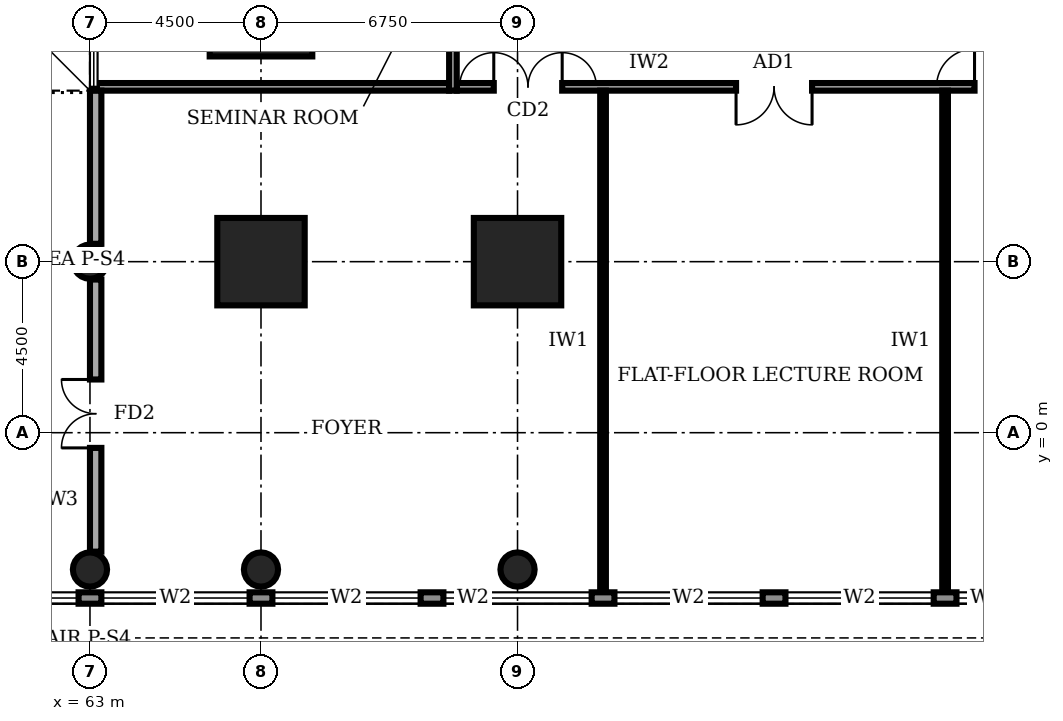
"""IFC4 building model, lengths in metres.
Left out: names, types, materials, properties, quantities, classifications, styles, units other than length and angle.
Written with IfcOpenShell. Run it as: python <this file> out.ifc"""

import sys

from ifc_helpers import new_model, si_unit, direction, frame, frame_2d, origin, origin_2d, place, context, subcontext, project, spatial, rectangle, circle, extrude, element, fill, save


model = new_model("IFC4")
c1 = context("Model", 3, precision=1e-05, world=origin(), true_north=direction((0.0, 1.0)))
c2 = subcontext(c1, "Body", "Model", "MODEL_VIEW")
j1 = project(units=[si_unit("LENGTHUNIT", "METRE"), si_unit("PLANEANGLEUNIT", "RADIAN")], contexts=[c1])
p1 = place(None, origin())
s1 = spatial("IfcSite", under=j1, at=p1, CompositionType="ELEMENT")
p2 = place(p1, origin())
s2 = spatial("IfcBuilding", under=s1, at=p2, CompositionType="ELEMENT")
p3 = place(p2, frame((0.0, 0.0, 6.0)))
s3 = spatial("IfcBuildingStorey", under=s2, at=p3, CompositionType="ELEMENT", Elevation=6.0)
for number, where, z_axis, x_axis in (
    (1, (67.5, 4.5, 0.0), (0.0, 0.0, 1.0), (1.0, 0.0, 0.0)),
    (2, (74.25, 4.5, 0.0), (0.0, 0.0, 1.0), (1.0, 0.0, 0.0)),
):
    element("IfcColumn", number, at=place(p3, frame(where, z_axis=z_axis, x_axis=x_axis)), inside=s3, PredefinedType="COLUMN", context=c2, shape_type="SweptSolid", body=[
        extrude(rectangle(XDim=2.3, YDim=2.3, at=origin_2d()), origin(), (0.0, 0.0, 1.0), 5.0),
    ])
p4 = place(p3, frame((67.5, 11.25, 0.0), z_axis=(0.0, 0.0, 1.0), x_axis=(1.0, 0.0, 0.0)))
e3 = element("IfcColumn", 3, at=p4, inside=s3, PredefinedType="COLUMN", context=c2, shape_type="SweptSolid", body=[
    extrude(rectangle(XDim=2.7, YDim=2.7, at=origin_2d()), origin(), (0.0, 0.0, 1.0), 5.0),
])
for number, where, z_axis, x_axis in (
    (4, (63.0, -3.6, 0.0), (0.0, 0.0, 1.0), (1.0, 0.0, 0.0)),
    (5, (67.5, -3.6, 0.0), (0.0, 0.0, 1.0), (1.0, 0.0, 0.0)),
    (6, (74.25, -3.6, 0.0), (0.0, 0.0, 1.0), (1.0, 0.0, 0.0)),
    (7, (63.0, 4.5, 0.0), (0.0, 0.0, 1.0), (1.0, 0.0, 0.0)),
):
    element("IfcColumn", number, at=place(p3, frame(where, z_axis=z_axis, x_axis=x_axis)), inside=s3, PredefinedType="COLUMN", context=c2, shape_type="SweptSolid", body=[
        extrude(circle(Radius=0.45, at=origin_2d()), origin(), (0.0, 0.0, 1.0), 5.0),
    ])
p5 = place(p3, frame((0.02, -4.35, 0.0), z_axis=(0.0, 0.0, 1.0), x_axis=(1.0, 0.0, 0.0)))
e8 = element("IfcWall", 8, at=p5, inside=s3, PredefinedType="STANDARD", context=c2, shape_type="SweptSolid", body=[
    extrude(rectangle(XDim=98.96, YDim=0.3, at=frame_2d((49.48, 0.0))), origin(), (0.0, 0.0, 1.0), 4.7),
])
p6 = place(p5, frame((4.78, 0.0, 0.6)))
e9 = element("IfcOpeningElement", 9, at=p6, cuts=e8, PredefinedType="OPENING", context=c2, shape_type="SweptSolid", body=[
    extrude(rectangle(XDim=3.9, YDim=2.6, at=frame_2d((1.95, 1.3))), frame((0.0, 0.16, 0.0), z_axis=(0.0, -1.0, 0.0), x_axis=(1.0, 0.0, 0.0)), (0.0, 0.0, 1.0), 0.32),
])
p7 = place(p5, frame((9.28, 0.0, 0.6)))
e10 = element("IfcOpeningElement", 10, at=p7, cuts=e8, PredefinedType="OPENING", context=c2, shape_type="SweptSolid", body=[
    extrude(rectangle(XDim=3.9, YDim=2.6, at=frame_2d((1.95, 1.3))), frame((0.0, 0.16, 0.0), z_axis=(0.0, -1.0, 0.0), x_axis=(1.0, 0.0, 0.0)), (0.0, 0.0, 1.0), 0.32),
])
p8 = place(p5, frame((13.78, 0.0, 0.6)))
e11 = element("IfcOpeningElement", 11, at=p8, cuts=e8, PredefinedType="OPENING", context=c2, shape_type="SweptSolid", body=[
    extrude(rectangle(XDim=3.9, YDim=2.6, at=frame_2d((1.95, 1.3))), frame((0.0, 0.16, 0.0), z_axis=(0.0, -1.0, 0.0), x_axis=(1.0, 0.0, 0.0)), (0.0, 0.0, 1.0), 0.32),
])
p9 = place(p5, frame((18.28, 0.0, 0.6)))
e12 = element("IfcOpeningElement", 12, at=p9, cuts=e8, PredefinedType="OPENING", context=c2, shape_type="SweptSolid", body=[
    extrude(rectangle(XDim=3.9, YDim=2.6, at=frame_2d((1.95, 1.3))), frame((0.0, 0.16, 0.0), z_axis=(0.0, -1.0, 0.0), x_axis=(1.0, 0.0, 0.0)), (0.0, 0.0, 1.0), 0.32),
])
p10 = place(p5, frame((22.78, 0.0, 0.6)))
e13 = element("IfcOpeningElement", 13, at=p10, cuts=e8, PredefinedType="OPENING", context=c2, shape_type="SweptSolid", body=[
    extrude(rectangle(XDim=3.9, YDim=2.6, at=frame_2d((1.95, 1.3))), frame((0.0, 0.16, 0.0), z_axis=(0.0, -1.0, 0.0), x_axis=(1.0, 0.0, 0.0)), (0.0, 0.0, 1.0), 0.32),
])
p11 = place(p5, frame((27.28, 0.0, 0.6)))
e14 = element("IfcOpeningElement", 14, at=p11, cuts=e8, PredefinedType="OPENING", context=c2, shape_type="SweptSolid", body=[
    extrude(rectangle(XDim=3.9, YDim=2.6, at=frame_2d((1.95, 1.3))), frame((0.0, 0.16, 0.0), z_axis=(0.0, -1.0, 0.0), x_axis=(1.0, 0.0, 0.0)), (0.0, 0.0, 1.0), 0.32),
])
p12 = place(p5, frame((31.78, 0.0, 0.6)))
e15 = element("IfcOpeningElement", 15, at=p12, cuts=e8, PredefinedType="OPENING", context=c2, shape_type="SweptSolid", body=[
    extrude(rectangle(XDim=3.9, YDim=2.6, at=frame_2d((1.95, 1.3))), frame((0.0, 0.16, 0.0), z_axis=(0.0, -1.0, 0.0), x_axis=(1.0, 0.0, 0.0)), (0.0, 0.0, 1.0), 0.32),
])
p13 = place(p5, frame((36.28, 0.0, 0.6)))
e16 = element("IfcOpeningElement", 16, at=p13, cuts=e8, PredefinedType="OPENING", context=c2, shape_type="SweptSolid", body=[
    extrude(rectangle(XDim=3.9, YDim=2.6, at=frame_2d((1.95, 1.3))), frame((0.0, 0.16, 0.0), z_axis=(0.0, -1.0, 0.0), x_axis=(1.0, 0.0, 0.0)), (0.0, 0.0, 1.0), 0.32),
])
p14 = place(p5, frame((40.78, 0.0, 0.6)))
e17 = element("IfcOpeningElement", 17, at=p14, cuts=e8, PredefinedType="OPENING", context=c2, shape_type="SweptSolid", body=[
    extrude(rectangle(XDim=3.9, YDim=2.6, at=frame_2d((1.95, 1.3))), frame((0.0, 0.16, 0.0), z_axis=(0.0, -1.0, 0.0), x_axis=(1.0, 0.0, 0.0)), (0.0, 0.0, 1.0), 0.32),
])
p15 = place(p5, frame((45.28, 0.0, 0.6)))
e18 = element("IfcOpeningElement", 18, at=p15, cuts=e8, PredefinedType="OPENING", context=c2, shape_type="SweptSolid", body=[
    extrude(rectangle(XDim=3.9, YDim=2.6, at=frame_2d((1.95, 1.3))), frame((0.0, 0.16, 0.0), z_axis=(0.0, -1.0, 0.0), x_axis=(1.0, 0.0, 0.0)), (0.0, 0.0, 1.0), 0.32),
])
p16 = place(p5, frame((49.78, 0.0, 0.6)))
e19 = element("IfcOpeningElement", 19, at=p16, cuts=e8, PredefinedType="OPENING", context=c2, shape_type="SweptSolid", body=[
    extrude(rectangle(XDim=3.9, YDim=2.6, at=frame_2d((1.95, 1.3))), frame((0.0, 0.16, 0.0), z_axis=(0.0, -1.0, 0.0), x_axis=(1.0, 0.0, 0.0)), (0.0, 0.0, 1.0), 0.32),
])
p17 = place(p5, frame((54.28, 0.0, 0.6)))
e20 = element("IfcOpeningElement", 20, at=p17, cuts=e8, PredefinedType="OPENING", context=c2, shape_type="SweptSolid", body=[
    extrude(rectangle(XDim=3.9, YDim=2.6, at=frame_2d((1.95, 1.3))), frame((0.0, 0.16, 0.0), z_axis=(0.0, -1.0, 0.0), x_axis=(1.0, 0.0, 0.0)), (0.0, 0.0, 1.0), 0.32),
])
p18 = place(p5, frame((58.78, 0.0, 0.6)))
e21 = element("IfcOpeningElement", 21, at=p18, cuts=e8, PredefinedType="OPENING", context=c2, shape_type="SweptSolid", body=[
    extrude(rectangle(XDim=3.9, YDim=2.6, at=frame_2d((1.95, 1.3))), frame((0.0, 0.16, 0.0), z_axis=(0.0, -1.0, 0.0), x_axis=(1.0, 0.0, 0.0)), (0.0, 0.0, 1.0), 0.32),
])
p19 = place(p5, frame((63.28, 0.0, 0.6)))
e22 = element("IfcOpeningElement", 22, at=p19, cuts=e8, PredefinedType="OPENING", context=c2, shape_type="SweptSolid", body=[
    extrude(rectangle(XDim=3.9, YDim=2.6, at=frame_2d((1.95, 1.3))), frame((0.0, 0.16, 0.0), z_axis=(0.0, -1.0, 0.0), x_axis=(1.0, 0.0, 0.0)), (0.0, 0.0, 1.0), 0.32),
])
p20 = place(p5, frame((67.78, 0.0, 0.6)))
e23 = element("IfcOpeningElement", 23, at=p20, cuts=e8, PredefinedType="OPENING", context=c2, shape_type="SweptSolid", body=[
    extrude(rectangle(XDim=3.9, YDim=2.6, at=frame_2d((1.95, 1.3))), frame((0.0, 0.16, 0.0), z_axis=(0.0, -1.0, 0.0), x_axis=(1.0, 0.0, 0.0)), (0.0, 0.0, 1.0), 0.32),
])
p21 = place(p5, frame((72.28, 0.0, 0.6)))
e24 = element("IfcOpeningElement", 24, at=p21, cuts=e8, PredefinedType="OPENING", context=c2, shape_type="SweptSolid", body=[
    extrude(rectangle(XDim=3.9, YDim=2.6, at=frame_2d((1.95, 1.3))), frame((0.0, 0.16, 0.0), z_axis=(0.0, -1.0, 0.0), x_axis=(1.0, 0.0, 0.0)), (0.0, 0.0, 1.0), 0.32),
])
p22 = place(p5, frame((76.78, 0.0, 0.6)))
e25 = element("IfcOpeningElement", 25, at=p22, cuts=e8, PredefinedType="OPENING", context=c2, shape_type="SweptSolid", body=[
    extrude(rectangle(XDim=3.9, YDim=2.6, at=frame_2d((1.95, 1.3))), frame((0.0, 0.16, 0.0), z_axis=(0.0, -1.0, 0.0), x_axis=(1.0, 0.0, 0.0)), (0.0, 0.0, 1.0), 0.32),
])
p23 = place(p5, frame((81.28, 0.0, 0.6)))
e26 = element("IfcOpeningElement", 26, at=p23, cuts=e8, PredefinedType="OPENING", context=c2, shape_type="SweptSolid", body=[
    extrude(rectangle(XDim=3.9, YDim=2.6, at=frame_2d((1.95, 1.3))), frame((0.0, 0.16, 0.0), z_axis=(0.0, -1.0, 0.0), x_axis=(1.0, 0.0, 0.0)), (0.0, 0.0, 1.0), 0.32),
])
p24 = place(p5, frame((85.78, 0.0, 0.6)))
e27 = element("IfcOpeningElement", 27, at=p24, cuts=e8, PredefinedType="OPENING", context=c2, shape_type="SweptSolid", body=[
    extrude(rectangle(XDim=3.9, YDim=2.6, at=frame_2d((1.95, 1.3))), frame((0.0, 0.16, 0.0), z_axis=(0.0, -1.0, 0.0), x_axis=(1.0, 0.0, 0.0)), (0.0, 0.0, 1.0), 0.32),
])
p25 = place(p5, frame((90.28, 0.0, 0.6)))
e28 = element("IfcOpeningElement", 28, at=p25, cuts=e8, PredefinedType="OPENING", context=c2, shape_type="SweptSolid", body=[
    extrude(rectangle(XDim=3.9, YDim=2.6, at=frame_2d((1.95, 1.3))), frame((0.0, 0.16, 0.0), z_axis=(0.0, -1.0, 0.0), x_axis=(1.0, 0.0, 0.0)), (0.0, 0.0, 1.0), 0.32),
])
p26 = place(p5, frame((94.78, 0.0, 0.6)))
e29 = element("IfcOpeningElement", 29, at=p26, cuts=e8, PredefinedType="OPENING", context=c2, shape_type="SweptSolid", body=[
    extrude(rectangle(XDim=3.9, YDim=2.6, at=frame_2d((1.95, 1.3))), frame((0.0, 0.16, 0.0), z_axis=(0.0, -1.0, 0.0), x_axis=(1.0, 0.0, 0.0)), (0.0, 0.0, 1.0), 0.32),
])
p27 = place(p3, frame((72.65, 9.1, 0.0), z_axis=(0.0, 0.0, 1.0), x_axis=(1.0, 0.0, 0.0)))
e30 = element("IfcWall", 30, at=p27, inside=s3, PredefinedType="SOLIDWALL", context=c2, shape_type="SweptSolid", body=[
    extrude(rectangle(XDim=16.9, YDim=0.2, at=frame_2d((8.45, 0.0))), origin(), (0.0, 0.0, 1.0), 4.7),
])
p28 = place(p27, frame((0.975, 0.0, 0.0)))
e31 = element("IfcOpeningElement", 31, at=p28, cuts=e30, PredefinedType="OPENING", context=c2, shape_type="SweptSolid", body=[
    extrude(rectangle(XDim=1.8, YDim=2.1, at=frame_2d((0.9, 1.05))), frame((0.0, 0.11, 0.0), z_axis=(0.0, -1.0, 0.0), x_axis=(1.0, 0.0, 0.0)), (0.0, 0.0, 1.0), 0.22),
])
p29 = place(p27, frame((7.35, 0.0, 0.0)))
e32 = element("IfcOpeningElement", 32, at=p29, cuts=e30, PredefinedType="OPENING", context=c2, shape_type="SweptSolid", body=[
    extrude(rectangle(XDim=2.0, YDim=2.4, at=frame_2d((1.0, 1.2))), frame((0.0, 0.11, 0.0), z_axis=(0.0, -1.0, 0.0), x_axis=(1.0, 0.0, 0.0)), (0.0, 0.0, 1.0), 0.22),
])
p30 = place(p27, frame((13.625, 0.0, 0.0)))
e33 = element("IfcOpeningElement", 33, at=p30, cuts=e30, PredefinedType="OPENING", context=c2, shape_type="SweptSolid", body=[
    extrude(rectangle(XDim=2.0, YDim=2.4, at=frame_2d((1.0, 1.2))), frame((0.0, 0.11, 0.0), z_axis=(0.0, -1.0, 0.0), x_axis=(1.0, 0.0, 0.0)), (0.0, 0.0, 1.0), 0.22),
])
p31 = place(p3, frame((72.55, 31.3, 0.0), z_axis=(0.0, 0.0, 1.0), x_axis=(0.0, -1.0, 0.0)))
e34 = element("IfcWall", 34, at=p31, inside=s3, PredefinedType="SOLIDWALL", context=c2, shape_type="SweptSolid", body=[
    extrude(rectangle(XDim=22.3, YDim=0.2, at=frame_2d((11.15, 0.0))), origin(), (0.0, 0.0, 1.0), 4.7),
])
p32 = place(p31, frame((19.55, 0.0, 0.0)))
e35 = element("IfcOpeningElement", 35, at=p32, cuts=e34, PredefinedType="OPENING", context=c2, shape_type="SweptSolid", body=[
    extrude(rectangle(XDim=1.0, YDim=2.1, at=frame_2d((0.5, 1.05))), frame((0.0, 0.11, 0.0), z_axis=(0.0, -1.0, 0.0), x_axis=(1.0, 0.0, 0.0)), (0.0, 0.0, 1.0), 0.22),
])
p33 = place(p31, frame((12.8, 0.0, 0.0)))
e36 = element("IfcOpeningElement", 36, at=p33, cuts=e34, PredefinedType="OPENING", context=c2, shape_type="SweptSolid", body=[
    extrude(rectangle(XDim=1.0, YDim=2.1, at=frame_2d((0.5, 1.05))), frame((0.0, 0.11, 0.0), z_axis=(0.0, -1.0, 0.0), x_axis=(1.0, 0.0, 0.0)), (0.0, 0.0, 1.0), 0.22),
])
p34 = place(p31, frame((3.8, 0.0, 0.0)))
e37 = element("IfcOpeningElement", 37, at=p34, cuts=e34, PredefinedType="OPENING", context=c2, shape_type="SweptSolid", body=[
    extrude(rectangle(XDim=1.0, YDim=2.1, at=frame_2d((0.5, 1.05))), frame((0.0, 0.11, 0.0), z_axis=(0.0, -1.0, 0.0), x_axis=(1.0, 0.0, 0.0)), (0.0, 0.0, 1.0), 0.22),
])
p35 = place(p3, frame((63.18, 9.1, 0.0), z_axis=(0.0, 0.0, 1.0), x_axis=(1.0, 0.0, 0.0)))
e38 = element("IfcWall", 38, at=p35, inside=s3, PredefinedType="SOLIDWALL", context=c2, shape_type="SweptSolid", body=[
    extrude(rectangle(XDim=9.27, YDim=0.2, at=frame_2d((4.635, 0.0))), origin(), (0.0, 0.0, 1.0), 4.7),
])
for number, where, z_axis, x_axis in (
    (39, (76.5, -4.2, 0.0), (0.0, 0.0, 1.0), (0.0, 1.0, 0.0)),
    (40, (85.5, -4.2, 0.0), (0.0, 0.0, 1.0), (0.0, 1.0, 0.0)),
):
    element("IfcWall", number, at=place(p3, frame(where, z_axis=z_axis, x_axis=x_axis)), inside=s3, PredefinedType="PARTITIONING", context=c2, shape_type="SweptSolid", body=[
        extrude(rectangle(XDim=13.2, YDim=0.15, at=frame_2d((6.6, 0.0))), origin(), (0.0, 0.0, 1.0), 4.7),
    ])
p36 = place(p3, frame((63.15, -3.13, 0.0), z_axis=(0.0, 0.0, 1.0), x_axis=(0.0, 1.0, 0.0)))
e41 = element("IfcWall", 41, at=p36, inside=s3, PredefinedType="SOLIDWALL", context=c2, shape_type="SweptSolid", body=[
    extrude(rectangle(XDim=7.16, YDim=0.3, at=frame_2d((3.58, 0.0))), origin(), (0.0, 0.0, 1.0), 3.7),
])
p37 = place(p36, frame((2.73, 0.0, 0.0)))
e42 = element("IfcOpeningElement", 42, at=p37, cuts=e41, PredefinedType="OPENING", context=c2, shape_type="SweptSolid", body=[
    extrude(rectangle(XDim=1.8, YDim=2.1, at=frame_2d((0.9, 1.05))), frame((0.0, 0.16, 0.0), z_axis=(0.0, -1.0, 0.0), x_axis=(1.0, 0.0, 0.0)), (0.0, 0.0, 1.0), 0.32),
])
p38 = place(p3, frame((63.15, 4.97, 0.0), z_axis=(0.0, 0.0, 1.0), x_axis=(0.0, 1.0, 0.0)))
e43 = element("IfcWall", 43, at=p38, inside=s3, PredefinedType="SOLIDWALL", context=c2, shape_type="SweptSolid", body=[
    extrude(rectangle(XDim=4.03, YDim=0.3, at=frame_2d((2.015, 0.0))), origin(), (0.0, 0.0, 1.0), 4.7),
])
p39 = place(p18, origin())
e44 = element("IfcWindow", 44, at=p39, inside=s3, PartitioningType="SINGLE_PANEL", PredefinedType="WINDOW", context=c2, shape_type="SweptSolid", body=[
    extrude(rectangle(XDim=3.9, YDim=2.6, at=frame_2d((1.95, 1.3))), frame((0.0, 0.03, 0.0), z_axis=(0.0, -1.0, 0.0), x_axis=(1.0, 0.0, 0.0)), (0.0, 0.0, 1.0), 0.06),
])
fill(e21, e44)
p40 = place(p19, origin())
e45 = element("IfcWindow", 45, at=p40, inside=s3, PartitioningType="SINGLE_PANEL", PredefinedType="WINDOW", context=c2, shape_type="SweptSolid", body=[
    extrude(rectangle(XDim=3.9, YDim=2.6, at=frame_2d((1.95, 1.3))), frame((0.0, 0.03, 0.0), z_axis=(0.0, -1.0, 0.0), x_axis=(1.0, 0.0, 0.0)), (0.0, 0.0, 1.0), 0.06),
])
fill(e22, e45)
p41 = place(p20, origin())
e46 = element("IfcWindow", 46, at=p41, inside=s3, PartitioningType="SINGLE_PANEL", PredefinedType="WINDOW", context=c2, shape_type="SweptSolid", body=[
    extrude(rectangle(XDim=3.9, YDim=2.6, at=frame_2d((1.95, 1.3))), frame((0.0, 0.03, 0.0), z_axis=(0.0, -1.0, 0.0), x_axis=(1.0, 0.0, 0.0)), (0.0, 0.0, 1.0), 0.06),
])
fill(e23, e46)
p42 = place(p21, origin())
e47 = element("IfcWindow", 47, at=p42, inside=s3, PartitioningType="SINGLE_PANEL", PredefinedType="WINDOW", context=c2, shape_type="SweptSolid", body=[
    extrude(rectangle(XDim=3.9, YDim=2.6, at=frame_2d((1.95, 1.3))), frame((0.0, 0.03, 0.0), z_axis=(0.0, -1.0, 0.0), x_axis=(1.0, 0.0, 0.0)), (0.0, 0.0, 1.0), 0.06),
])
fill(e24, e47)
p43 = place(p22, origin())
e48 = element("IfcWindow", 48, at=p43, inside=s3, PartitioningType="SINGLE_PANEL", PredefinedType="WINDOW", context=c2, shape_type="SweptSolid", body=[
    extrude(rectangle(XDim=3.9, YDim=2.6, at=frame_2d((1.95, 1.3))), frame((0.0, 0.03, 0.0), z_axis=(0.0, -1.0, 0.0), x_axis=(1.0, 0.0, 0.0)), (0.0, 0.0, 1.0), 0.06),
])
fill(e25, e48)
p44 = place(p23, origin())
e49 = element("IfcWindow", 49, at=p44, inside=s3, PartitioningType="SINGLE_PANEL", PredefinedType="WINDOW", context=c2, shape_type="SweptSolid", body=[
    extrude(rectangle(XDim=3.9, YDim=2.6, at=frame_2d((1.95, 1.3))), frame((0.0, 0.03, 0.0), z_axis=(0.0, -1.0, 0.0), x_axis=(1.0, 0.0, 0.0)), (0.0, 0.0, 1.0), 0.06),
])
fill(e26, e49)
p45 = place(p24, origin())
e50 = element("IfcWindow", 50, at=p45, inside=s3, PartitioningType="SINGLE_PANEL", PredefinedType="WINDOW", context=c2, shape_type="SweptSolid", body=[
    extrude(rectangle(XDim=3.9, YDim=2.6, at=frame_2d((1.95, 1.3))), frame((0.0, 0.03, 0.0), z_axis=(0.0, -1.0, 0.0), x_axis=(1.0, 0.0, 0.0)), (0.0, 0.0, 1.0), 0.06),
])
fill(e27, e50)
p46 = place(p28, origin())
e51 = element("IfcDoor", 51, at=p46, inside=s3, OperationType="DOUBLE_DOOR_SINGLE_SWING", PredefinedType="DOOR", context=c2, shape_type="SweptSolid", body=[
    extrude(rectangle(XDim=1.8, YDim=2.1, at=frame_2d((0.9, 1.05))), frame((0.0, 0.025, 0.0), z_axis=(0.0, -1.0, 0.0), x_axis=(1.0, 0.0, 0.0)), (0.0, 0.0, 1.0), 0.05),
])
fill(e31, e51)
p47 = place(p29, frame((2.0, 0.0, 0.0), z_axis=(0.0, 0.0, 1.0), x_axis=(-1.0, 0.0, 0.0)))
e52 = element("IfcDoor", 52, at=p47, inside=s3, OperationType="DOUBLE_DOOR_SINGLE_SWING", PredefinedType="DOOR", context=c2, shape_type="SweptSolid", body=[
    extrude(rectangle(XDim=2.0, YDim=2.4, at=frame_2d((1.0, 1.2))), frame((0.0, 0.025, 0.0), z_axis=(0.0, -1.0, 0.0), x_axis=(1.0, 0.0, 0.0)), (0.0, 0.0, 1.0), 0.05),
])
fill(e32, e52)
p48 = place(p30, origin())
e53 = element("IfcDoor", 53, at=p48, inside=s3, OperationType="DOUBLE_DOOR_SINGLE_SWING", PredefinedType="DOOR", context=c2, shape_type="SweptSolid", body=[
    extrude(rectangle(XDim=2.0, YDim=2.4, at=frame_2d((1.0, 1.2))), frame((0.0, 0.025, 0.0), z_axis=(0.0, -1.0, 0.0), x_axis=(1.0, 0.0, 0.0)), (0.0, 0.0, 1.0), 0.05),
])
fill(e33, e53)
p49 = place(p37, origin())
e54 = element("IfcDoor", 54, at=p49, inside=s3, OperationType="DOUBLE_DOOR_SINGLE_SWING", PredefinedType="DOOR", context=c2, shape_type="SweptSolid", body=[
    extrude(rectangle(XDim=1.8, YDim=2.1, at=frame_2d((0.9, 1.05))), frame((0.0, 0.025, 0.0), z_axis=(0.0, -1.0, 0.0), x_axis=(1.0, 0.0, 0.0)), (0.0, 0.0, 1.0), 0.05),
])
fill(e42, e54)
save(model, sys.argv[1])
